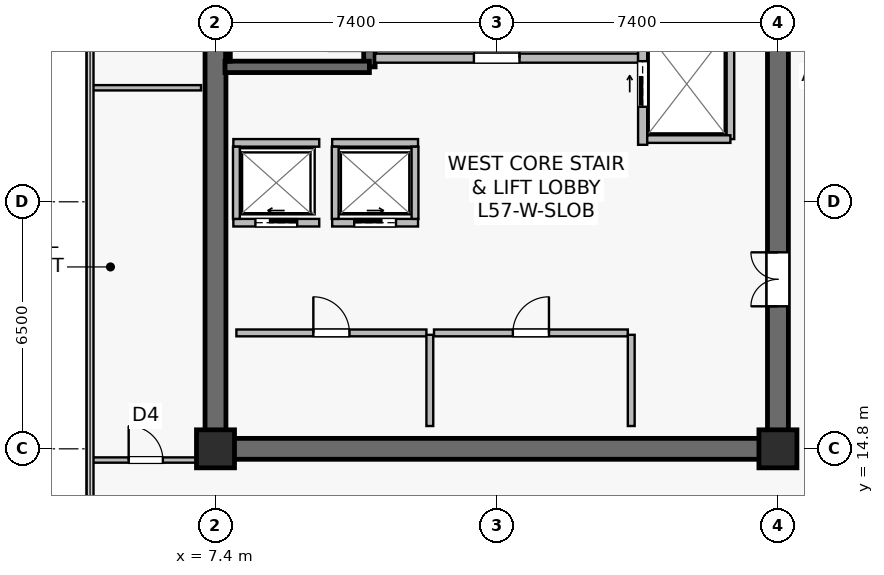
"""IFC4 building model, lengths in metres.
Left out: names, types, materials, properties, quantities, classifications, styles, units other than length and angle.
Written with IfcOpenShell. Run it as: python <this file> out.ifc"""

import sys

from ifc_helpers import new_model, si_unit, direction, frame, frame_2d, origin, origin_2d, place, context, subcontext, project, spatial, rectangle, extrude, source, transform, mapped, element, fill, save


model = new_model("IFC4")
c1 = context("Model", 3, precision=1e-05, world=origin(), true_north=direction((0.0, 1.0)))
c2 = subcontext(c1, "Body", "Model", "MODEL_VIEW")
j1 = project(units=[si_unit("LENGTHUNIT", "METRE"), si_unit("PLANEANGLEUNIT", "RADIAN")], contexts=[c1])
p1 = place(None, origin())
s1 = spatial("IfcSite", under=j1, at=p1, CompositionType="ELEMENT")
p2 = place(p1, origin())
s2 = spatial("IfcBuilding", under=s1, at=p2, CompositionType="ELEMENT")
p3 = place(p2, frame((0.0, 0.0, 238.3)))
s3 = spatial("IfcBuildingStorey", under=s2, at=p3, CompositionType="ELEMENT", Elevation=238.3)
p4 = place(p3, frame((7.125, 14.8, 0.0), z_axis=(0.0, 0.0, 1.0), x_axis=(1.0, 0.0, 0.0)))
e1 = element("IfcWall", 1, at=p4, inside=s3, PredefinedType="SHEAR", context=c2, shape_type="SweptSolid", body=[
    extrude(rectangle(XDim=15.35, YDim=0.55, at=frame_2d((7.675, 0.0))), origin(), (0.0, 0.0, 1.0), 3.8),
])
p5 = place(p3, frame((7.4, 15.075, 0.0), z_axis=(0.0, 0.0, 1.0), x_axis=(0.0, 1.0, 0.0)))
e2 = element("IfcWall", 2, at=p5, inside=s3, PredefinedType="SHEAR", context=c2, shape_type="SweptSolid", body=[
    extrude(rectangle(XDim=18.45, YDim=0.55, at=frame_2d((9.225, 0.0))), origin(), (0.0, 0.0, 1.0), 3.8),
])
p6 = place(p3, frame((22.2, 15.075, 0.0), z_axis=(0.0, 0.0, 1.0), x_axis=(0.0, 1.0, 0.0)))
e3 = element("IfcWall", 3, at=p6, inside=s3, PredefinedType="SHEAR", context=c2, shape_type="SweptSolid", body=[
    extrude(rectangle(XDim=18.45, YDim=0.55, at=frame_2d((9.225, 0.0))), origin(), (0.0, 0.0, 1.0), 3.8),
])
p7 = place(p6, frame((3.475, 0.0, 0.0)))
e4 = element("IfcOpeningElement", 4, at=p7, cuts=e3, PredefinedType="OPENING", context=c2, shape_type="SweptSolid", body=[
    extrude(rectangle(XDim=1.42, YDim=2.2, at=frame_2d((0.71, 1.1))), frame((0.0, 0.285, 0.0), z_axis=(0.0, -1.0, 0.0), x_axis=(1.0, 0.0, 0.0)), (0.0, 0.0, 1.0), 0.57),
])
p8 = place(p3, frame((11.45, 24.85, 0.0), z_axis=(0.0, 0.0, 1.0), x_axis=(0.0, 1.0, 0.0)))
e5 = element("IfcWall", 5, at=p8, inside=s3, PredefinedType="SHEAR", context=c2, shape_type="SweptSolid", body=[
    extrude(rectangle(XDim=8.63, YDim=0.3, at=frame_2d((4.315, 0.0))), origin(), (0.0, 0.0, 1.0), 3.8),
])
p9 = place(p8, frame((0.42, 0.0, 0.0)))
e6 = element("IfcOpeningElement", 6, at=p9, cuts=e5, PredefinedType="OPENING", context=c2, shape_type="SweptSolid", body=[
    extrude(rectangle(XDim=1.1, YDim=2.15, at=frame_2d((0.55, 1.075))), frame((0.0, 0.16, 0.0), z_axis=(0.0, -1.0, 0.0), x_axis=(1.0, 0.0, 0.0)), (0.0, 0.0, 1.0), 0.32),
])
p10 = place(p3, frame((7.65, 24.85, 0.0), z_axis=(0.0, 0.0, 1.0), x_axis=(1.0, 0.0, 0.0)))
e7 = element("IfcWall", 7, at=p10, inside=s3, PredefinedType="SHEAR", context=c2, shape_type="SweptSolid", body=[
    extrude(rectangle(XDim=3.8, YDim=0.3, at=frame_2d((1.9, 0.0))), origin(), (0.0, 0.0, 1.0), 3.8),
])
p11 = place(p3, frame((7.73, 25.0, 0.0), z_axis=(0.0, 0.0, 1.0), x_axis=(0.0, 1.0, 0.0)))
e8 = element("IfcWall", 8, at=p11, inside=s3, PredefinedType="SOLIDWALL", context=c2, shape_type="SweptSolid", body=[
    extrude(rectangle(XDim=8.32, YDim=0.12, at=frame_2d((4.16, 0.0))), origin(), (0.0, 0.0, 1.0), 3.8),
])
m1 = source(origin(), c2, "Body", "SweptSolid", [
    extrude(rectangle(XDim=1.0, YDim=1.0, at=origin_2d()), origin(), (0.0, 0.0, 1.0), 4.1),
])
for number, where, z_axis, x_axis in (
    (9, (7.4, 14.8, 0.0), (0.0, 0.0, 1.0), (1.0, 0.0, 0.0)),
    (10, (22.2, 14.8, 0.0), (0.0, 0.0, 1.0), (1.0, 0.0, 0.0)),
):
    element("IfcColumn", number, at=place(p3, frame(where, z_axis=z_axis, x_axis=x_axis)), inside=s3, PredefinedType="COLUMN", context=c2, shape_type="MappedRepresentation", body=[
        mapped(m1, transform((0.0, 0.0, 0.0), scale=1.0)),
    ])
p12 = place(p3, frame((11.6, 25.08, 0.0), z_axis=(0.0, 0.0, 1.0), x_axis=(1.0, 0.0, 0.0)))
e11 = element("IfcWall", 11, at=p12, inside=s3, PredefinedType="SOLIDWALL", context=c2, shape_type="SweptSolid", body=[
    extrude(rectangle(XDim=6.92, YDim=0.24, at=frame_2d((3.46, 0.0))), origin(), (0.0, 0.0, 1.0), 3.197),
])
p13 = place(p12, frame((2.6, 0.0, 0.0)))
e12 = element("IfcOpeningElement", 12, at=p13, cuts=e11, PredefinedType="OPENING", context=c2, shape_type="SweptSolid", body=[
    extrude(rectangle(XDim=1.2, YDim=2.16, at=frame_2d((0.6, 1.08))), frame((0.0, 0.13, 0.0), z_axis=(0.0, -1.0, 0.0), x_axis=(1.0, 0.0, 0.0)), (0.0, 0.0, 1.0), 0.26),
])
p14 = place(p3, frame((18.64, 22.8, 0.0), z_axis=(0.0, 0.0, 1.0), x_axis=(0.0, 1.0, 0.0)))
e13 = element("IfcWall", 13, at=p14, inside=s3, PredefinedType="SOLIDWALL", context=c2, shape_type="SweptSolid", body=[
    extrude(rectangle(XDim=6.85, YDim=0.24, at=frame_2d((3.425, 0.0))), origin(), (0.0, 0.0, 1.0), 2.935),
])
p15 = place(p14, frame((4.85, 0.0, 0.0)))
e14 = element("IfcOpeningElement", 14, at=p15, cuts=e13, PredefinedType="OPENING", context=c2, shape_type="SweptSolid", body=[
    extrude(rectangle(XDim=1.1, YDim=2.22, at=frame_2d((0.55, 1.11))), frame((0.0, 0.13, 0.0), z_axis=(0.0, -1.0, 0.0), x_axis=(1.0, 0.0, 0.0)), (0.0, 0.0, 1.0), 0.26),
])
p16 = place(p14, frame((1.0, 0.0, 0.0)))
e15 = element("IfcOpeningElement", 15, at=p16, cuts=e13, PredefinedType="OPENING", context=c2, shape_type="SweptSolid", body=[
    extrude(rectangle(XDim=1.2, YDim=2.22, at=frame_2d((0.6, 1.11))), frame((0.0, 0.13, 0.0), z_axis=(0.0, -1.0, 0.0), x_axis=(1.0, 0.0, 0.0)), (0.0, 0.0, 1.0), 0.26),
])
p17 = place(p3, frame((7.87, 20.75, 0.0), z_axis=(0.0, 0.0, 1.0), x_axis=(1.0, 0.0, 0.0)))
e16 = element("IfcWall", 16, at=p17, inside=s3, PredefinedType="SOLIDWALL", context=c2, shape_type="SweptSolid", body=[
    extrude(rectangle(XDim=2.26, YDim=0.2, at=frame_2d((1.13, 0.0))), origin(), (0.0, 0.0, 1.0), 3.8),
])
p18 = place(p17, frame((0.58, 0.0, 0.0)))
e17 = element("IfcOpeningElement", 17, at=p18, cuts=e16, PredefinedType="OPENING", context=c2, shape_type="SweptSolid", body=[
    extrude(rectangle(XDim=1.1, YDim=2.22, at=frame_2d((0.55, 1.11))), frame((0.0, 0.11, 0.0), z_axis=(0.0, -1.0, 0.0), x_axis=(1.0, 0.0, 0.0)), (0.0, 0.0, 1.0), 0.22),
])
p19 = place(p3, frame((7.87, 22.85, 0.0), z_axis=(0.0, 0.0, 1.0), x_axis=(1.0, 0.0, 0.0)))
e18 = element("IfcWall", 18, at=p19, inside=s3, PredefinedType="SOLIDWALL", context=c2, shape_type="SweptSolid", body=[
    extrude(rectangle(XDim=2.26, YDim=0.2, at=frame_2d((1.13, 0.0))), origin(), (0.0, 0.0, 1.0), 3.8),
])
p20 = place(p3, frame((7.95, 20.85, 0.0), z_axis=(0.0, 0.0, 1.0), x_axis=(0.0, 1.0, 0.0)))
e19 = element("IfcWall", 19, at=p20, inside=s3, PredefinedType="SOLIDWALL", context=c2, shape_type="SweptSolid", body=[
    extrude(rectangle(XDim=1.9, YDim=0.18, at=frame_2d((0.95, 0.0))), origin(), (0.0, 0.0, 1.0), 3.8),
])
p21 = place(p3, frame((10.47, 20.75, 0.0), z_axis=(0.0, 0.0, 1.0), x_axis=(1.0, 0.0, 0.0)))
e20 = element("IfcWall", 20, at=p21, inside=s3, PredefinedType="SOLIDWALL", context=c2, shape_type="SweptSolid", body=[
    extrude(rectangle(XDim=2.26, YDim=0.2, at=frame_2d((1.13, 0.0))), origin(), (0.0, 0.0, 1.0), 3.8),
])
p22 = place(p21, frame((0.58, 0.0, 0.0)))
e21 = element("IfcOpeningElement", 21, at=p22, cuts=e20, PredefinedType="OPENING", context=c2, shape_type="SweptSolid", body=[
    extrude(rectangle(XDim=1.1, YDim=2.22, at=frame_2d((0.55, 1.11))), frame((0.0, 0.11, 0.0), z_axis=(0.0, -1.0, 0.0), x_axis=(1.0, 0.0, 0.0)), (0.0, 0.0, 1.0), 0.22),
])
p23 = place(p3, frame((10.47, 22.85, 0.0), z_axis=(0.0, 0.0, 1.0), x_axis=(1.0, 0.0, 0.0)))
e22 = element("IfcWall", 22, at=p23, inside=s3, PredefinedType="SOLIDWALL", context=c2, shape_type="SweptSolid", body=[
    extrude(rectangle(XDim=2.26, YDim=0.2, at=frame_2d((1.13, 0.0))), origin(), (0.0, 0.0, 1.0), 3.8),
])
for number, where, z_axis, x_axis in (
    (23, (10.55, 20.85, 0.0), (0.0, 0.0, 1.0), (0.0, 1.0, 0.0)),
    (24, (12.65, 20.85, 0.0), (0.0, 0.0, 1.0), (0.0, 1.0, 0.0)),
):
    element("IfcWall", number, at=place(p3, frame(where, z_axis=z_axis, x_axis=x_axis)), inside=s3, PredefinedType="SOLIDWALL", context=c2, shape_type="SweptSolid", body=[
        extrude(rectangle(XDim=1.9, YDim=0.18, at=frame_2d((0.95, 0.0))), origin(), (0.0, 0.0, 1.0), 3.8),
    ])
p24 = place(p3, frame((20.95, 22.95, 0.0), z_axis=(0.0, 0.0, 1.0), x_axis=(0.0, 1.0, 0.0)))
e25 = element("IfcWall", 25, at=p24, inside=s3, PredefinedType="SOLIDWALL", context=c2, shape_type="SweptSolid", body=[
    extrude(rectangle(XDim=2.9, YDim=0.2, at=frame_2d((1.45, 0.0))), origin(), (0.0, 0.0, 1.0), 2.935),
])
p25 = place(p3, frame((18.76, 22.95, 0.0), z_axis=(0.0, 0.0, 1.0), x_axis=(1.0, 0.0, 0.0)))
e26 = element("IfcWall", 26, at=p25, inside=s3, PredefinedType="SOLIDWALL", context=c2, shape_type="SweptSolid", body=[
    extrude(rectangle(XDim=2.19, YDim=0.2, at=frame_2d((1.095, 0.0))), origin(), (0.0, 0.0, 1.0), 3.8),
])
p26 = place(p3, frame((7.95, 17.85, 0.0), z_axis=(0.0, 0.0, 1.0), x_axis=(1.0, 0.0, 0.0)))
e27 = element("IfcWall", 27, at=p26, inside=s3, PredefinedType="SOLIDWALL", context=c2, shape_type="SweptSolid", body=[
    extrude(rectangle(XDim=5.0, YDim=0.18, at=frame_2d((2.5, 0.0))), origin(), (0.0, 0.0, 1.0), 3.8),
])
p27 = place(p26, frame((2.025, 0.0, 0.0)))
e28 = element("IfcOpeningElement", 28, at=p27, cuts=e27, PredefinedType="OPENING", context=c2, shape_type="SweptSolid", body=[
    extrude(rectangle(XDim=0.95, YDim=2.15, at=frame_2d((0.475, 1.075))), frame((0.0, 0.1, 0.0), z_axis=(0.0, -1.0, 0.0), x_axis=(1.0, 0.0, 0.0)), (0.0, 0.0, 1.0), 0.2),
])
p28 = place(p3, frame((13.04, 15.4, 0.0), z_axis=(0.0, 0.0, 1.0), x_axis=(0.0, 1.0, 0.0)))
e29 = element("IfcWall", 29, at=p28, inside=s3, PredefinedType="SOLIDWALL", context=c2, shape_type="SweptSolid", body=[
    extrude(rectangle(XDim=2.4, YDim=0.18, at=frame_2d((1.2, 0.0))), origin(), (0.0, 0.0, 1.0), 3.8),
])
p29 = place(p3, frame((13.15, 17.85, 0.0), z_axis=(0.0, 0.0, 1.0), x_axis=(1.0, 0.0, 0.0)))
e30 = element("IfcWall", 30, at=p29, inside=s3, PredefinedType="SOLIDWALL", context=c2, shape_type="SweptSolid", body=[
    extrude(rectangle(XDim=5.1, YDim=0.18, at=frame_2d((2.55, 0.0))), origin(), (0.0, 0.0, 1.0), 3.197),
])
p30 = place(p29, frame((2.075, 0.0, 0.0)))
e31 = element("IfcOpeningElement", 31, at=p30, cuts=e30, PredefinedType="OPENING", context=c2, shape_type="SweptSolid", body=[
    extrude(rectangle(XDim=0.95, YDim=2.15, at=frame_2d((0.475, 1.075))), frame((0.0, 0.1, 0.0), z_axis=(0.0, -1.0, 0.0), x_axis=(1.0, 0.0, 0.0)), (0.0, 0.0, 1.0), 0.2),
])
p31 = place(p3, frame((18.34, 15.4, 0.0), z_axis=(0.0, 0.0, 1.0), x_axis=(0.0, 1.0, 0.0)))
e32 = element("IfcWall", 32, at=p31, inside=s3, PredefinedType="SOLIDWALL", context=c2, shape_type="SweptSolid", body=[
    extrude(rectangle(XDim=2.4, YDim=0.18, at=frame_2d((1.2, 0.0))), origin(), (0.0, 0.0, 1.0), 3.8),
])
p32 = place(p3, frame((4.11, 24.3, 0.0), z_axis=(0.0, 0.0, 1.0), x_axis=(1.0, 0.0, 0.0)))
e33 = element("IfcWall", 33, at=p32, inside=s3, PredefinedType="PARTITIONING", context=c2, shape_type="SweptSolid", body=[
    extrude(rectangle(XDim=2.91, YDim=0.14, at=frame_2d((1.455, 0.0))), origin(), (0.0, 0.0, 1.0), 3.8),
])
p33 = place(p3, frame((4.11, 14.505, 0.0), z_axis=(0.0, 0.0, 1.0), x_axis=(1.0, 0.0, 0.0)))
e34 = element("IfcWall", 34, at=p33, inside=s3, PredefinedType="PARTITIONING", context=c2, shape_type="SweptSolid", body=[
    extrude(rectangle(XDim=2.91, YDim=0.14, at=frame_2d((1.455, 0.0))), origin(), (0.0, 0.0, 1.0), 3.8),
])
p34 = place(p33, frame((1.005, 0.0, 0.0)))
e35 = element("IfcOpeningElement", 35, at=p34, cuts=e34, PredefinedType="OPENING", context=c2, shape_type="SweptSolid", body=[
    extrude(rectangle(XDim=0.9, YDim=2.1, at=frame_2d((0.45, 1.05))), frame((0.0, 0.08, 0.0), z_axis=(0.0, -1.0, 0.0), x_axis=(1.0, 0.0, 0.0)), (0.0, 0.0, 1.0), 0.16),
])
m2 = source(origin(), c2, "Body", "SweptSolid", [
    extrude(rectangle(XDim=1.2, YDim=2.16, at=frame_2d((0.6, 1.08))), frame((0.0, 0.025, 0.0), z_axis=(0.0, -1.0, 0.0), x_axis=(1.0, 0.0, 0.0)), (0.0, 0.0, 1.0), 0.05),
])
p35 = place(p13, origin())
e36 = element("IfcDoor", 36, at=p35, inside=s3, OperationType="SINGLE_SWING_RIGHT", PredefinedType="DOOR", context=c2, shape_type="MappedRepresentation", body=[
    mapped(m2, transform((0.0, 0.0, 0.0), scale=1.0)),
])
fill(e12, e36)
m3 = source(origin(), c2, "Body", "SweptSolid", [
    extrude(rectangle(XDim=1.1, YDim=2.22, at=frame_2d((0.55, 1.11))), frame((0.0, 0.025, 0.0), z_axis=(0.0, -1.0, 0.0), x_axis=(1.0, 0.0, 0.0)), (0.0, 0.0, 1.0), 0.05),
])
p36 = place(p18, origin())
e37 = element("IfcDoor", 37, at=p36, inside=s3, OperationType="SLIDING_TO_LEFT", PredefinedType="USERDEFINED", context=c2, shape_type="MappedRepresentation", body=[
    mapped(m3, transform((0.0, 0.0, 0.0), scale=1.0)),
])
fill(e17, e37)
p37 = place(p22, origin())
e38 = element("IfcDoor", 38, at=p37, inside=s3, OperationType="SLIDING_TO_RIGHT", PredefinedType="USERDEFINED", context=c2, shape_type="MappedRepresentation", body=[
    mapped(m3, transform((0.0, 0.0, 0.0), scale=1.0)),
])
fill(e21, e38)
m4 = source(origin(), c2, "Body", "SweptSolid", [
    extrude(rectangle(XDim=1.2, YDim=2.22, at=frame_2d((0.6, 1.11))), frame((0.0, 0.025, 0.0), z_axis=(0.0, -1.0, 0.0), x_axis=(1.0, 0.0, 0.0)), (0.0, 0.0, 1.0), 0.05),
])
p38 = place(p16, origin())
e39 = element("IfcDoor", 39, at=p38, inside=s3, OperationType="SLIDING_TO_RIGHT", PredefinedType="USERDEFINED", context=c2, shape_type="MappedRepresentation", body=[
    mapped(m4, transform((0.0, 0.0, 0.0), scale=1.0)),
])
fill(e15, e39)
m5 = source(origin(), c2, "Body", "SweptSolid", [
    extrude(rectangle(XDim=0.95, YDim=2.15, at=frame_2d((0.475, 1.075))), frame((0.0, 0.025, 0.0), z_axis=(0.0, -1.0, 0.0), x_axis=(1.0, 0.0, 0.0)), (0.0, 0.0, 1.0), 0.05),
])
p39 = place(p27, origin())
e40 = element("IfcDoor", 40, at=p39, inside=s3, OperationType="SINGLE_SWING_LEFT", PredefinedType="DOOR", context=c2, shape_type="MappedRepresentation", body=[
    mapped(m5, transform((0.0, 0.0, 0.0), scale=1.0)),
])
fill(e28, e40)
p40 = place(p30, origin())
e41 = element("IfcDoor", 41, at=p40, inside=s3, OperationType="SINGLE_SWING_RIGHT", PredefinedType="DOOR", context=c2, shape_type="MappedRepresentation", body=[
    mapped(m5, transform((0.0, 0.0, 0.0), scale=1.0)),
])
fill(e31, e41)
m6 = source(origin(), c2, "Body", "SweptSolid", [
    extrude(rectangle(XDim=1.42, YDim=2.2, at=frame_2d((0.71, 1.1))), frame((0.0, 0.025, 0.0), z_axis=(0.0, -1.0, 0.0), x_axis=(1.0, 0.0, 0.0)), (0.0, 0.0, 1.0), 0.05),
])
p41 = place(p7, origin())
e42 = element("IfcDoor", 42, at=p41, inside=s3, OperationType="DOUBLE_DOOR_SINGLE_SWING", PredefinedType="DOOR", context=c2, shape_type="MappedRepresentation", body=[
    mapped(m6, transform((0.0, 0.0, 0.0), scale=1.0)),
])
fill(e4, e42)
m7 = source(origin(), c2, "Body", "SweptSolid", [
    extrude(rectangle(XDim=0.9, YDim=2.1, at=frame_2d((0.45, 1.05))), frame((0.0, 0.025, 0.0), z_axis=(0.0, -1.0, 0.0), x_axis=(1.0, 0.0, 0.0)), (0.0, 0.0, 1.0), 0.05),
])
p42 = place(p34, origin())
e43 = element("IfcDoor", 43, at=p42, inside=s3, OperationType="SINGLE_SWING_LEFT", PredefinedType="DOOR", context=c2, shape_type="MappedRepresentation", body=[
    mapped(m7, transform((0.0, 0.0, 0.0), scale=1.0)),
])
fill(e35, e43)
save(model, sys.argv[1])
